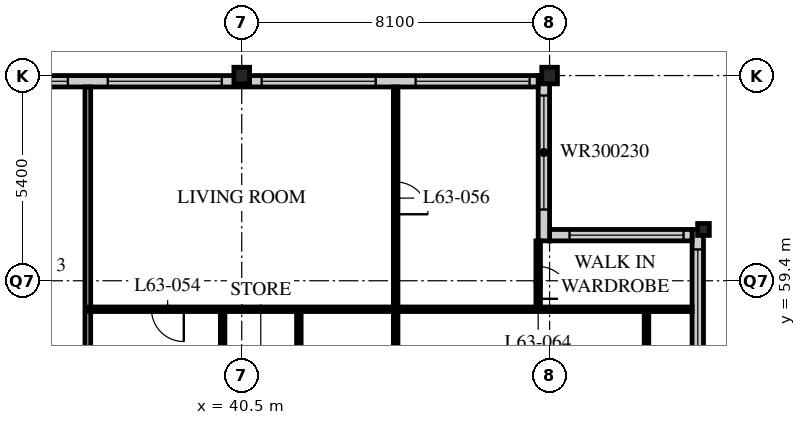
"""IFC4 building model, lengths in metres.
Left out: names, types, materials, properties, quantities, classifications, styles, units other than length and angle.
Written with IfcOpenShell. Run it as: python <this file> out.ifc"""

import sys

from ifc_helpers import new_model, si_unit, direction, frame, frame_2d, origin, origin_2d, place, context, subcontext, project, spatial, rectangle, i_section, extrude, element, fill, save


model = new_model("IFC4")
c1 = context("Model", 3, precision=1e-05, world=origin(), true_north=direction((0.0, 1.0)))
c2 = subcontext(c1, "Body", "Model", "MODEL_VIEW")
j1 = project(units=[si_unit("LENGTHUNIT", "METRE"), si_unit("PLANEANGLEUNIT", "RADIAN")], contexts=[c1])
p1 = place(None, origin())
s1 = spatial("IfcSite", under=j1, at=p1, CompositionType="ELEMENT")
p2 = place(p1, origin())
s2 = spatial("IfcBuilding", under=s1, at=p2, CompositionType="ELEMENT")
p3 = place(p2, frame((0.0, 0.0, 246.3)))
s3 = spatial("IfcBuildingStorey", under=s2, at=p3, CompositionType="ELEMENT", Elevation=246.3)
for number, where, z_axis, x_axis in (
    (1, (40.5, 64.8, 0.0), (0.0, 0.0, 1.0), (1.0, 0.0, 0.0)),
    (2, (48.6, 64.8, 0.0), (0.0, 0.0, 1.0), (1.0, 0.0, 0.0)),
):
    element("IfcColumn", number, at=place(p3, frame(where, z_axis=z_axis, x_axis=x_axis)), inside=s3, PredefinedType="COLUMN", context=c2, shape_type="SweptSolid", body=[
        extrude(i_section(OverallWidth=0.412, OverallDepth=0.437, WebThickness=0.036, FlangeThickness=0.058, FilletRadius=0.015, at=origin_2d()), origin(), (0.0, 0.0, 1.0), 3.9),
    ])
p4 = place(p3, frame((52.65, 60.75, 0.0), z_axis=(0.0, 0.0, 1.0), x_axis=(1.0, 0.0, 0.0)))
e3 = element("IfcColumn", 3, at=p4, inside=s3, PredefinedType="COLUMN", context=c2, shape_type="SweptSolid", body=[
    extrude(i_section(OverallWidth=0.307, OverallDepth=0.314, WebThickness=0.012, FlangeThickness=0.019, FilletRadius=0.015, at=origin_2d()), origin(), (0.0, 0.0, 1.0), 3.9),
])
p5 = place(p3, frame((52.5, 56.4, 0.0), z_axis=(0.0, 0.0, 1.0), x_axis=(0.0, 1.0, 0.0)))
e4 = element("IfcWall", 4, at=p5, inside=s3, PredefinedType="SOLIDWALL", context=c2, shape_type="SweptSolid", body=[
    extrude(rectangle(XDim=4.35, YDim=0.3, at=frame_2d((2.175, 0.0))), origin(), (0.0, 0.0, 1.0), 3.69),
])
p6 = place(p5, frame((0.825, 0.0, 0.6)))
e5 = element("IfcOpeningElement", 5, at=p6, cuts=e4, PredefinedType="OPENING", context=c2, shape_type="SweptSolid", body=[
    extrude(rectangle(XDim=3.0, YDim=2.3, at=frame_2d((1.5, 1.15))), frame((0.0, 0.16, 0.0), z_axis=(0.0, -1.0, 0.0), x_axis=(1.0, 0.0, 0.0)), (0.0, 0.0, 1.0), 0.32),
])
p7 = place(p3, frame((52.35, 60.6, 0.0), z_axis=(0.0, 0.0, 1.0), x_axis=(-1.0, 0.0, 0.0)))
e6 = element("IfcWall", 6, at=p7, inside=s3, PredefinedType="SOLIDWALL", context=c2, shape_type="SweptSolid", body=[
    extrude(rectangle(XDim=3.75, YDim=0.3, at=frame_2d((1.875, 0.0))), origin(), (0.0, 0.0, 1.0), 3.69),
])
p8 = place(p7, frame((0.225, 0.0, 0.6)))
e7 = element("IfcOpeningElement", 7, at=p8, cuts=e6, PredefinedType="OPENING", context=c2, shape_type="SweptSolid", body=[
    extrude(rectangle(XDim=3.0, YDim=2.3, at=frame_2d((1.5, 1.15))), frame((0.0, 0.16, 0.0), z_axis=(0.0, -1.0, 0.0), x_axis=(1.0, 0.0, 0.0)), (0.0, 0.0, 1.0), 0.32),
])
p9 = place(p3, frame((48.45, 60.45, 0.0), z_axis=(0.0, 0.0, 1.0), x_axis=(0.0, 1.0, 0.0)))
e8 = element("IfcWall", 8, at=p9, inside=s3, PredefinedType="SOLIDWALL", context=c2, shape_type="SweptSolid", body=[
    extrude(rectangle(XDim=4.35, YDim=0.3, at=frame_2d((2.175, 0.0))), origin(), (0.0, 0.0, 1.0), 3.69),
])
p10 = place(p9, frame((0.825, 0.0, 0.6)))
e9 = element("IfcOpeningElement", 9, at=p10, cuts=e8, PredefinedType="OPENING", context=c2, shape_type="SweptSolid", body=[
    extrude(rectangle(XDim=3.0, YDim=2.3, at=frame_2d((1.5, 1.15))), frame((0.0, 0.16, 0.0), z_axis=(0.0, -1.0, 0.0), x_axis=(1.0, 0.0, 0.0)), (0.0, 0.0, 1.0), 0.32),
])
p11 = place(p3, frame((48.3, 64.65, 0.0), z_axis=(0.0, 0.0, 1.0), x_axis=(-1.0, 0.0, 0.0)))
e10 = element("IfcWall", 10, at=p11, inside=s3, PredefinedType="SOLIDWALL", context=c2, shape_type="SweptSolid", body=[
    extrude(rectangle(XDim=40.2, YDim=0.3, at=frame_2d((20.1, 0.0))), origin(), (0.0, 0.0, 1.0), 3.69),
])
p12 = place(p11, frame((0.225, 0.0, 0.6)))
e11 = element("IfcOpeningElement", 11, at=p12, cuts=e10, PredefinedType="OPENING", context=c2, shape_type="SweptSolid", body=[
    extrude(rectangle(XDim=3.0, YDim=2.4, at=frame_2d((1.5, 1.2))), frame((0.0, 0.16, 0.0), z_axis=(0.0, -1.0, 0.0), x_axis=(1.0, 0.0, 0.0)), (0.0, 0.0, 1.0), 0.32),
])
p13 = place(p11, frame((4.275, 0.0, 0.6)))
e12 = element("IfcOpeningElement", 12, at=p13, cuts=e10, PredefinedType="OPENING", context=c2, shape_type="SweptSolid", body=[
    extrude(rectangle(XDim=3.0, YDim=2.4, at=frame_2d((1.5, 1.2))), frame((0.0, 0.16, 0.0), z_axis=(0.0, -1.0, 0.0), x_axis=(1.0, 0.0, 0.0)), (0.0, 0.0, 1.0), 0.32),
])
p14 = place(p11, frame((8.325, 0.0, 0.6)))
e13 = element("IfcOpeningElement", 13, at=p14, cuts=e10, PredefinedType="OPENING", context=c2, shape_type="SweptSolid", body=[
    extrude(rectangle(XDim=3.0, YDim=2.4, at=frame_2d((1.5, 1.2))), frame((0.0, 0.16, 0.0), z_axis=(0.0, -1.0, 0.0), x_axis=(1.0, 0.0, 0.0)), (0.0, 0.0, 1.0), 0.32),
])
p15 = place(p11, frame((12.375, 0.0, 0.6)))
e14 = element("IfcOpeningElement", 14, at=p15, cuts=e10, PredefinedType="OPENING", context=c2, shape_type="SweptSolid", body=[
    extrude(rectangle(XDim=3.0, YDim=2.4, at=frame_2d((1.5, 1.2))), frame((0.0, 0.16, 0.0), z_axis=(0.0, -1.0, 0.0), x_axis=(1.0, 0.0, 0.0)), (0.0, 0.0, 1.0), 0.32),
])
p16 = place(p11, frame((16.425, 0.0, 0.6)))
e15 = element("IfcOpeningElement", 15, at=p16, cuts=e10, PredefinedType="OPENING", context=c2, shape_type="SweptSolid", body=[
    extrude(rectangle(XDim=3.0, YDim=2.4, at=frame_2d((1.5, 1.2))), frame((0.0, 0.16, 0.0), z_axis=(0.0, -1.0, 0.0), x_axis=(1.0, 0.0, 0.0)), (0.0, 0.0, 1.0), 0.32),
])
p17 = place(p11, frame((20.475, 0.0, 0.6)))
e16 = element("IfcOpeningElement", 16, at=p17, cuts=e10, PredefinedType="OPENING", context=c2, shape_type="SweptSolid", body=[
    extrude(rectangle(XDim=3.0, YDim=2.4, at=frame_2d((1.5, 1.2))), frame((0.0, 0.16, 0.0), z_axis=(0.0, -1.0, 0.0), x_axis=(1.0, 0.0, 0.0)), (0.0, 0.0, 1.0), 0.32),
])
p18 = place(p11, frame((24.525, 0.0, 0.6)))
e17 = element("IfcOpeningElement", 17, at=p18, cuts=e10, PredefinedType="OPENING", context=c2, shape_type="SweptSolid", body=[
    extrude(rectangle(XDim=3.0, YDim=2.4, at=frame_2d((1.5, 1.2))), frame((0.0, 0.16, 0.0), z_axis=(0.0, -1.0, 0.0), x_axis=(1.0, 0.0, 0.0)), (0.0, 0.0, 1.0), 0.32),
])
p19 = place(p11, frame((28.575, 0.0, 0.6)))
e18 = element("IfcOpeningElement", 18, at=p19, cuts=e10, PredefinedType="OPENING", context=c2, shape_type="SweptSolid", body=[
    extrude(rectangle(XDim=3.0, YDim=2.4, at=frame_2d((1.5, 1.2))), frame((0.0, 0.16, 0.0), z_axis=(0.0, -1.0, 0.0), x_axis=(1.0, 0.0, 0.0)), (0.0, 0.0, 1.0), 0.32),
])
p20 = place(p11, frame((32.625, 0.0, 0.6)))
e19 = element("IfcOpeningElement", 19, at=p20, cuts=e10, PredefinedType="OPENING", context=c2, shape_type="SweptSolid", body=[
    extrude(rectangle(XDim=3.0, YDim=2.4, at=frame_2d((1.5, 1.2))), frame((0.0, 0.16, 0.0), z_axis=(0.0, -1.0, 0.0), x_axis=(1.0, 0.0, 0.0)), (0.0, 0.0, 1.0), 0.32),
])
p21 = place(p11, frame((36.675, 0.0, 0.6)))
e20 = element("IfcOpeningElement", 20, at=p21, cuts=e10, PredefinedType="OPENING", context=c2, shape_type="SweptSolid", body=[
    extrude(rectangle(XDim=3.0, YDim=2.4, at=frame_2d((1.5, 1.2))), frame((0.0, 0.16, 0.0), z_axis=(0.0, -1.0, 0.0), x_axis=(1.0, 0.0, 0.0)), (0.0, 0.0, 1.0), 0.32),
])
p22 = place(p3, frame((36.45, 64.5, 0.0), z_axis=(0.0, 0.0, 1.0), x_axis=(0.0, -1.0, 0.0)))
e21 = element("IfcWall", 21, at=p22, inside=s3, PredefinedType="PARTITIONING", context=c2, shape_type="SweptSolid", body=[
    extrude(rectangle(XDim=11.85, YDim=0.15, at=frame_2d((5.925, 0.0))), origin(), (0.0, 0.0, 1.0), 3.69),
])
p23 = place(p3, frame((36.45, 58.65, 0.0), z_axis=(0.0, 0.0, 1.0), x_axis=(1.0, 0.0, 0.0)))
e22 = element("IfcWall", 22, at=p23, inside=s3, PredefinedType="PARTITIONING", context=c2, shape_type="SweptSolid", body=[
    extrude(rectangle(XDim=15.9, YDim=0.12, at=frame_2d((7.95, 0.0))), origin(), (0.0, 0.0, 1.0), 3.69),
])
p24 = place(p23, frame((1.675, 0.0, 0.0)))
e23 = element("IfcOpeningElement", 23, at=p24, cuts=e22, PredefinedType="OPENING", context=c2, shape_type="SweptSolid", body=[
    extrude(rectangle(XDim=0.85, YDim=2.1, at=frame_2d((0.425, 1.05))), frame((0.0, 0.07, 0.0), z_axis=(0.0, -1.0, 0.0), x_axis=(1.0, 0.0, 0.0)), (0.0, 0.0, 1.0), 0.14),
])
p25 = place(p3, frame((44.55, 64.5, 0.0), z_axis=(0.0, 0.0, 1.0), x_axis=(0.0, -1.0, 0.0)))
e24 = element("IfcWall", 24, at=p25, inside=s3, PredefinedType="PARTITIONING", context=c2, shape_type="SweptSolid", body=[
    extrude(rectangle(XDim=13.65, YDim=0.12, at=frame_2d((6.825, 0.0))), origin(), (0.0, 0.0, 1.0), 3.69),
])
p26 = place(p25, frame((8.425, 0.0, 0.0)))
e25 = element("IfcOpeningElement", 25, at=p26, cuts=e24, PredefinedType="OPENING", context=c2, shape_type="SweptSolid", body=[
    extrude(rectangle(XDim=0.85, YDim=2.1, at=frame_2d((0.425, 1.05))), frame((0.0, 0.07, 0.0), z_axis=(0.0, -1.0, 0.0), x_axis=(1.0, 0.0, 0.0)), (0.0, 0.0, 1.0), 0.14),
])
p27 = place(p25, frame((2.5, 0.0, 0.0)))
e26 = element("IfcOpeningElement", 26, at=p27, cuts=e24, PredefinedType="OPENING", context=c2, shape_type="SweptSolid", body=[
    extrude(rectangle(XDim=0.85, YDim=2.1, at=frame_2d((0.425, 1.05))), frame((0.0, 0.07, 0.0), z_axis=(0.0, -1.0, 0.0), x_axis=(1.0, 0.0, 0.0)), (0.0, 0.0, 1.0), 0.14),
])
p28 = place(p3, frame((48.3, 58.65, 0.0), z_axis=(0.0, 0.0, 1.0), x_axis=(0.0, 1.0, 0.0)))
e27 = element("IfcWall", 27, at=p28, inside=s3, PredefinedType="PARTITIONING", context=c2, shape_type="SweptSolid", body=[
    extrude(rectangle(XDim=1.8, YDim=0.12, at=frame_2d((0.9, 0.0))), origin(), (0.0, 0.0, 1.0), 3.69),
])
p29 = place(p28, frame((0.275, 0.0, 0.0)))
e28 = element("IfcOpeningElement", 28, at=p29, cuts=e27, PredefinedType="OPENING", context=c2, shape_type="SweptSolid", body=[
    extrude(rectangle(XDim=0.85, YDim=2.1, at=frame_2d((0.425, 1.05))), frame((0.0, 0.07, 0.0), z_axis=(0.0, -1.0, 0.0), x_axis=(1.0, 0.0, 0.0)), (0.0, 0.0, 1.0), 0.14),
])
p30 = place(p3, frame((51.15, 50.85, 0.0), z_axis=(0.0, 0.0, 1.0), x_axis=(0.0, 1.0, 0.0)))
e29 = element("IfcWall", 29, at=p30, inside=s3, PredefinedType="PARTITIONING", context=c2, shape_type="SweptSolid", body=[
    extrude(rectangle(XDim=7.8, YDim=0.12, at=frame_2d((3.9, 0.0))), origin(), (0.0, 0.0, 1.0), 3.69),
])
p31 = place(p30, frame((3.475, 0.0, 0.0)))
e30 = element("IfcOpeningElement", 30, at=p31, cuts=e29, PredefinedType="OPENING", context=c2, shape_type="SweptSolid", body=[
    extrude(rectangle(XDim=0.85, YDim=2.1, at=frame_2d((0.425, 1.05))), frame((0.0, 0.07, 0.0), z_axis=(0.0, -1.0, 0.0), x_axis=(1.0, 0.0, 0.0)), (0.0, 0.0, 1.0), 0.14),
])
for number, where, z_axis, x_axis in (
    (31, (39.997, 58.65, 0.0), (0.0, 0.0, 1.0), (0.0, -1.0, 0.0)),
    (32, (42.003, 58.65, 0.0), (0.0, 0.0, 1.0), (0.0, -1.0, 0.0)),
):
    element("IfcWall", number, at=place(p3, frame(where, z_axis=z_axis, x_axis=x_axis)), inside=s3, PredefinedType="PARTITIONING", context=c2, shape_type="SweptSolid", body=[
        extrude(rectangle(XDim=2.213, YDim=0.12, at=frame_2d((1.106, 0.0))), origin(), (0.0, 0.0, 1.0), 3.69),
    ])
p32 = place(p6, origin())
e33 = element("IfcWindow", 33, at=p32, inside=s3, PartitioningType="SINGLE_PANEL", PredefinedType="WINDOW", context=c2, shape_type="SweptSolid", body=[
    extrude(rectangle(XDim=3.0, YDim=2.3, at=frame_2d((1.5, 1.15))), frame((0.0, 0.03, 0.0), z_axis=(0.0, -1.0, 0.0), x_axis=(1.0, 0.0, 0.0)), (0.0, 0.0, 1.0), 0.06),
])
fill(e5, e33)
p33 = place(p8, origin())
e34 = element("IfcWindow", 34, at=p33, inside=s3, PartitioningType="SINGLE_PANEL", PredefinedType="WINDOW", context=c2, shape_type="SweptSolid", body=[
    extrude(rectangle(XDim=3.0, YDim=2.3, at=frame_2d((1.5, 1.15))), frame((0.0, 0.03, 0.0), z_axis=(0.0, -1.0, 0.0), x_axis=(1.0, 0.0, 0.0)), (0.0, 0.0, 1.0), 0.06),
])
fill(e7, e34)
p34 = place(p10, origin())
e35 = element("IfcWindow", 35, at=p34, inside=s3, PartitioningType="SINGLE_PANEL", PredefinedType="WINDOW", context=c2, shape_type="SweptSolid", body=[
    extrude(rectangle(XDim=3.0, YDim=2.3, at=frame_2d((1.5, 1.15))), frame((0.0, 0.03, 0.0), z_axis=(0.0, -1.0, 0.0), x_axis=(1.0, 0.0, 0.0)), (0.0, 0.0, 1.0), 0.06),
])
fill(e9, e35)
p35 = place(p12, origin())
e36 = element("IfcWindow", 36, at=p35, inside=s3, PartitioningType="SINGLE_PANEL", PredefinedType="WINDOW", context=c2, shape_type="SweptSolid", body=[
    extrude(rectangle(XDim=3.0, YDim=2.4, at=frame_2d((1.5, 1.2))), frame((0.0, 0.03, 0.0), z_axis=(0.0, -1.0, 0.0), x_axis=(1.0, 0.0, 0.0)), (0.0, 0.0, 1.0), 0.06),
])
fill(e11, e36)
p36 = place(p13, origin())
e37 = element("IfcWindow", 37, at=p36, inside=s3, PartitioningType="SINGLE_PANEL", PredefinedType="WINDOW", context=c2, shape_type="SweptSolid", body=[
    extrude(rectangle(XDim=3.0, YDim=2.4, at=frame_2d((1.5, 1.2))), frame((0.0, 0.03, 0.0), z_axis=(0.0, -1.0, 0.0), x_axis=(1.0, 0.0, 0.0)), (0.0, 0.0, 1.0), 0.06),
])
fill(e12, e37)
p37 = place(p14, origin())
e38 = element("IfcWindow", 38, at=p37, inside=s3, PartitioningType="SINGLE_PANEL", PredefinedType="WINDOW", context=c2, shape_type="SweptSolid", body=[
    extrude(rectangle(XDim=3.0, YDim=2.4, at=frame_2d((1.5, 1.2))), frame((0.0, 0.03, 0.0), z_axis=(0.0, -1.0, 0.0), x_axis=(1.0, 0.0, 0.0)), (0.0, 0.0, 1.0), 0.06),
])
fill(e13, e38)
p38 = place(p15, origin())
e39 = element("IfcWindow", 39, at=p38, inside=s3, PartitioningType="SINGLE_PANEL", PredefinedType="WINDOW", context=c2, shape_type="SweptSolid", body=[
    extrude(rectangle(XDim=3.0, YDim=2.4, at=frame_2d((1.5, 1.2))), frame((0.0, 0.03, 0.0), z_axis=(0.0, -1.0, 0.0), x_axis=(1.0, 0.0, 0.0)), (0.0, 0.0, 1.0), 0.06),
])
fill(e14, e39)
p39 = place(p24, origin())
e40 = element("IfcDoor", 40, at=p39, inside=s3, OperationType="SINGLE_SWING_LEFT", PredefinedType="DOOR", context=c2, shape_type="SweptSolid", body=[
    extrude(rectangle(XDim=0.85, YDim=2.1, at=frame_2d((0.425, 1.05))), frame((0.0, 0.025, 0.0), z_axis=(0.0, -1.0, 0.0), x_axis=(1.0, 0.0, 0.0)), (0.0, 0.0, 1.0), 0.05),
])
fill(e23, e40)
p40 = place(p27, origin())
e41 = element("IfcDoor", 41, at=p40, inside=s3, OperationType="SINGLE_SWING_RIGHT", PredefinedType="DOOR", context=c2, shape_type="SweptSolid", body=[
    extrude(rectangle(XDim=0.85, YDim=2.1, at=frame_2d((0.425, 1.05))), frame((0.0, 0.025, 0.0), z_axis=(0.0, -1.0, 0.0), x_axis=(1.0, 0.0, 0.0)), (0.0, 0.0, 1.0), 0.05),
])
fill(e26, e41)
p41 = place(p29, origin())
e42 = element("IfcDoor", 42, at=p41, inside=s3, OperationType="SINGLE_SWING_RIGHT", PredefinedType="DOOR", context=c2, shape_type="SweptSolid", body=[
    extrude(rectangle(XDim=0.85, YDim=2.1, at=frame_2d((0.425, 1.05))), frame((0.0, 0.025, 0.0), z_axis=(0.0, -1.0, 0.0), x_axis=(1.0, 0.0, 0.0)), (0.0, 0.0, 1.0), 0.05),
])
fill(e28, e42)
save(model, sys.argv[1])
